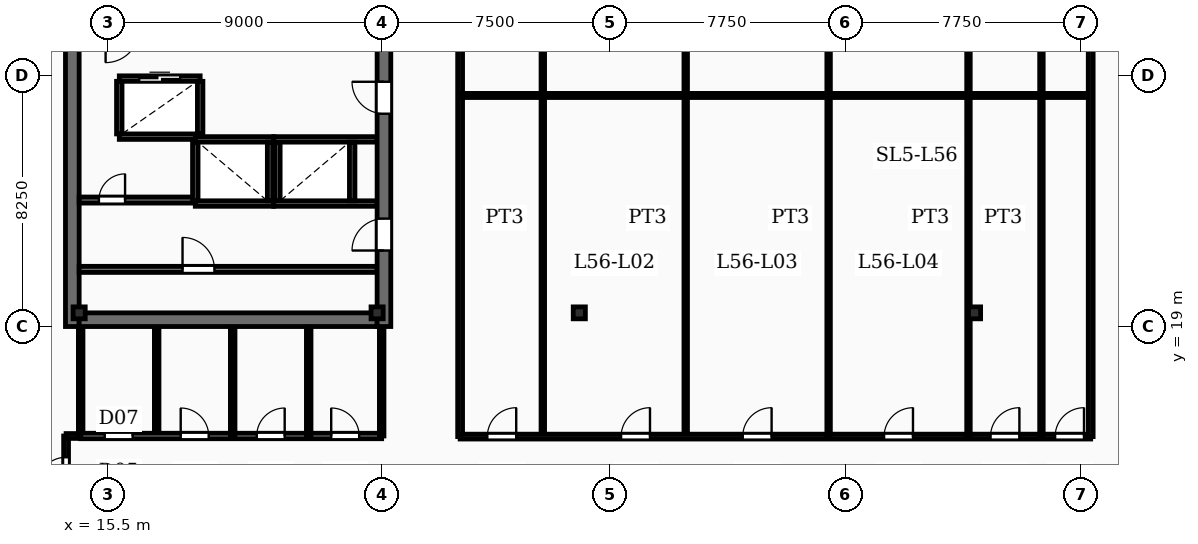
"""IFC4 building model, lengths in metres.
Left out: names, types, materials, properties, quantities, classifications, styles, units other than length and angle.
Written with IfcOpenShell. Run it as: python <this file> out.ifc"""

import sys

from ifc_helpers import new_model, si_unit, direction, frame, frame_2d, origin, origin_2d, place, context, subcontext, project, spatial, rectangle, i_section, extrude, element, fill, save


model = new_model("IFC4")
c1 = context("Model", 3, precision=1e-05, world=origin(), true_north=direction((0.0, 1.0)))
c2 = subcontext(c1, "Body", "Model", "MODEL_VIEW")
j1 = project(units=[si_unit("LENGTHUNIT", "METRE"), si_unit("PLANEANGLEUNIT", "RADIAN")], contexts=[c1])
p1 = place(None, origin())
s1 = spatial("IfcSite", under=j1, at=p1, CompositionType="ELEMENT")
p2 = place(p1, origin())
s2 = spatial("IfcBuilding", under=s1, at=p2, CompositionType="ELEMENT")
p3 = place(p2, frame((0.0, 0.0, 232.2)))
s3 = spatial("IfcBuildingStorey", under=s2, at=p3, CompositionType="ELEMENT", Elevation=232.2)
p4 = place(p3, frame((14.325, 19.0, -0.27), z_axis=(0.0, 0.0, 1.0), x_axis=(0.0, 1.0, 0.0)))
e1 = element("IfcWall", 1, at=p4, inside=s3, PredefinedType="SHEAR", context=c2, shape_type="SweptSolid", body=[
    extrude(rectangle(XDim=15.3, YDim=0.45, at=frame_2d((7.65, 0.0))), origin(), (0.0, 0.0, 1.0), 3.75),
])
p5 = place(p3, frame((24.575, 19.0, -0.27), z_axis=(0.0, 0.0, 1.0), x_axis=(0.0, 1.0, 0.0)))
e2 = element("IfcWall", 2, at=p5, inside=s3, PredefinedType="SHEAR", context=c2, shape_type="SweptSolid", body=[
    extrude(rectangle(XDim=15.3, YDim=0.45, at=frame_2d((7.65, 0.0))), origin(), (0.0, 0.0, 1.0), 3.75),
])
p6 = place(p5, frame((2.5, 0.0, 0.27)))
e3 = element("IfcOpeningElement", 3, at=p6, cuts=e2, PredefinedType="OPENING", context=c2, shape_type="SweptSolid", body=[
    extrude(rectangle(XDim=1.05, YDim=2.15, at=frame_2d((0.525, 1.075))), frame((0.0, 0.235, 0.0), z_axis=(0.0, -1.0, 0.0), x_axis=(1.0, 0.0, 0.0)), (0.0, 0.0, 1.0), 0.47),
])
p7 = place(p5, frame((7.0, 0.0, 0.27)))
e4 = element("IfcOpeningElement", 4, at=p7, cuts=e2, PredefinedType="OPENING", context=c2, shape_type="SweptSolid", body=[
    extrude(rectangle(XDim=1.05, YDim=2.15, at=frame_2d((0.525, 1.075))), frame((0.0, 0.235, 0.0), z_axis=(0.0, -1.0, 0.0), x_axis=(1.0, 0.0, 0.0)), (0.0, 0.0, 1.0), 0.47),
])
p8 = place(p3, frame((14.55, 19.225, -0.27), z_axis=(0.0, 0.0, 1.0), x_axis=(1.0, 0.0, 0.0)))
e5 = element("IfcWall", 5, at=p8, inside=s3, PredefinedType="SHEAR", context=c2, shape_type="SweptSolid", body=[
    extrude(rectangle(XDim=9.8, YDim=0.45, at=frame_2d((4.9, 0.0))), origin(), (0.0, 0.0, 1.0), 3.75),
])
for number, where, z_axis, x_axis in (
    (6, (14.55, 19.45, -0.27), (0.0, 0.0, 1.0), (1.0, 0.0, 0.0)),
    (7, (24.35, 19.45, -0.27), (0.0, 0.0, 1.0), (1.0, 0.0, 0.0)),
    (8, (31.0, 19.45, -0.27), (0.0, 0.0, 1.0), (1.0, 0.0, 0.0)),
    (9, (44.0, 19.45, -0.27), (0.0, 0.0, 1.0), (1.0, 0.0, 0.0)),
):
    element("IfcColumn", number, at=place(p3, frame(where, z_axis=z_axis, x_axis=x_axis)), inside=s3, PredefinedType="COLUMN", context=c2, shape_type="SweptSolid", body=[
        extrude(i_section(OverallWidth=0.399, OverallDepth=0.393, WebThickness=0.023, FlangeThickness=0.037, FilletRadius=0.02, at=origin_2d()), origin(), (0.0, 0.0, 1.0), 3.75),
    ])
p9 = place(p3, frame((10.211, 10.701, 0.0), z_axis=(0.0, 0.0, 1.0), x_axis=(0.113203107947, 0.993571867733, 0.0)))
e10 = element("IfcWall", 10, at=p9, inside=s3, PredefinedType="SOLIDWALL", context=c2, shape_type="SweptSolid", body=[
    extrude(rectangle(XDim=34.5, YDim=0.36, at=frame_2d((17.25, 0.0))), origin(), (0.0, 0.0, 1.0), 3.48),
])
p10 = place(p9, frame((4.2, 0.0, 0.88)))
e11 = element("IfcOpeningElement", 11, at=p10, cuts=e10, PredefinedType="OPENING", context=c2, shape_type="SweptSolid", body=[
    extrude(rectangle(XDim=1.35, YDim=2.2, at=frame_2d((0.675, 1.1))), frame((0.0, 0.19, 0.0), z_axis=(0.0, -1.0, 0.0), x_axis=(1.0, 0.0, 0.0)), (0.0, 0.0, 1.0), 0.38),
])
p11 = place(p9, frame((15.4, 0.0, 0.88)))
e12 = element("IfcOpeningElement", 12, at=p11, cuts=e10, PredefinedType="OPENING", context=c2, shape_type="SweptSolid", body=[
    extrude(rectangle(XDim=1.35, YDim=2.2, at=frame_2d((0.675, 1.1))), frame((0.0, 0.19, 0.0), z_axis=(0.0, -1.0, 0.0), x_axis=(1.0, 0.0, 0.0)), (0.0, 0.0, 1.0), 0.38),
])
p12 = place(p9, frame((26.6, 0.0, 0.88)))
e13 = element("IfcOpeningElement", 13, at=p12, cuts=e10, PredefinedType="OPENING", context=c2, shape_type="SweptSolid", body=[
    extrude(rectangle(XDim=1.35, YDim=2.2, at=frame_2d((0.675, 1.1))), frame((0.0, 0.19, 0.0), z_axis=(0.0, -1.0, 0.0), x_axis=(1.0, 0.0, 0.0)), (0.0, 0.0, 1.0), 0.38),
])
for number, where, z_axis, x_axis in (
    (14, (18.37, 25.155, 0.0), (0.0, 0.0, 1.0), (1.0, 0.0, 0.0)),
    (15, (18.37, 23.045, 0.0), (0.0, 0.0, 1.0), (1.0, 0.0, 0.0)),
):
    element("IfcWall", number, at=place(p3, frame(where, z_axis=z_axis, x_axis=x_axis)), inside=s3, PredefinedType="SOLIDWALL", context=c2, shape_type="SweptSolid", body=[
        extrude(rectangle(XDim=2.58, YDim=0.18, at=frame_2d((1.29, 0.0))), origin(), (0.0, 0.0, 1.0), 3.48),
    ])
for number, where, z_axis, x_axis in (
    (16, (18.37, 23.135, 0.0), (0.0, 0.0, 1.0), (0.0, 1.0, 0.0)),
    (17, (20.83, 23.135, 0.0), (0.0, 0.0, 1.0), (0.0, 1.0, 0.0)),
):
    element("IfcWall", number, at=place(p3, frame(where, z_axis=z_axis, x_axis=x_axis)), inside=s3, PredefinedType="SOLIDWALL", context=c2, shape_type="SweptSolid", body=[
        extrude(rectangle(XDim=1.93, YDim=0.18, at=frame_2d((0.965, 0.0))), origin(), (0.0, 0.0, 1.0), 3.48),
    ])
for number, where, z_axis, x_axis in (
    (18, (20.95, 25.155, 0.0), (0.0, 0.0, 1.0), (1.0, 0.0, 0.0)),
    (19, (20.95, 23.045, 0.0), (0.0, 0.0, 1.0), (1.0, 0.0, 0.0)),
):
    element("IfcWall", number, at=place(p3, frame(where, z_axis=z_axis, x_axis=x_axis)), inside=s3, PredefinedType="SOLIDWALL", context=c2, shape_type="SweptSolid", body=[
        extrude(rectangle(XDim=3.4, YDim=0.18, at=frame_2d((1.7, 0.0))), origin(), (0.0, 0.0, 1.0), 3.48),
    ])
for number, where, z_axis, x_axis in (
    (20, (21.07, 23.135, 0.0), (0.0, 0.0, 1.0), (0.0, 1.0, 0.0)),
    (21, (23.53, 23.135, 0.0), (0.0, 0.0, 1.0), (0.0, 1.0, 0.0)),
):
    element("IfcWall", number, at=place(p3, frame(where, z_axis=z_axis, x_axis=x_axis)), inside=s3, PredefinedType="SOLIDWALL", context=c2, shape_type="SweptSolid", body=[
        extrude(rectangle(XDim=1.93, YDim=0.18, at=frame_2d((0.965, 0.0))), origin(), (0.0, 0.0, 1.0), 3.48),
    ])
p13 = place(p3, frame((15.87, 27.155, 0.0), z_axis=(0.0, 0.0, 1.0), x_axis=(1.0, 0.0, 0.0)))
e22 = element("IfcWall", 22, at=p13, inside=s3, PredefinedType="SOLIDWALL", context=c2, shape_type="SweptSolid", body=[
    extrude(rectangle(XDim=2.66, YDim=0.18, at=frame_2d((1.33, 0.0))), origin(), (0.0, 0.0, 1.0), 3.48),
])
p14 = place(p13, frame((0.655, 0.0, 0.0)))
e23 = element("IfcOpeningElement", 23, at=p14, cuts=e22, PredefinedType="OPENING", context=c2, shape_type="SweptSolid", body=[
    extrude(rectangle(XDim=1.35, YDim=2.3, at=frame_2d((0.675, 1.15))), frame((0.0, 0.1, 0.0), z_axis=(0.0, -1.0, 0.0), x_axis=(1.0, 0.0, 0.0)), (0.0, 0.0, 1.0), 0.2),
])
p15 = place(p3, frame((15.87, 25.245, 0.0), z_axis=(0.0, 0.0, 1.0), x_axis=(1.0, 0.0, 0.0)))
e24 = element("IfcWall", 24, at=p15, inside=s3, PredefinedType="SOLIDWALL", context=c2, shape_type="SweptSolid", body=[
    extrude(rectangle(XDim=2.66, YDim=0.18, at=frame_2d((1.33, 0.0))), origin(), (0.0, 0.0, 1.0), 3.48),
])
for number, where, z_axis, x_axis in (
    (25, (15.87, 25.335, 0.0), (0.0, 0.0, 1.0), (0.0, 1.0, 0.0)),
    (26, (18.53, 25.335, 0.0), (0.0, 0.0, 1.0), (0.0, 1.0, 0.0)),
):
    element("IfcWall", number, at=place(p3, frame(where, z_axis=z_axis, x_axis=x_axis)), inside=s3, PredefinedType="SOLIDWALL", context=c2, shape_type="SweptSolid", body=[
        extrude(rectangle(XDim=1.73, YDim=0.18, at=frame_2d((0.865, 0.0))), origin(), (0.0, 0.0, 1.0), 3.48),
    ])
p16 = place(p3, frame((14.55, 20.88, 0.0), z_axis=(0.0, 0.0, 1.0), x_axis=(1.0, 0.0, 0.0)))
e27 = element("IfcWall", 27, at=p16, inside=s3, PredefinedType="SOLIDWALL", context=c2, shape_type="SweptSolid", body=[
    extrude(rectangle(XDim=9.8, YDim=0.2, at=frame_2d((4.9, 0.0))), origin(), (0.0, 0.0, 1.0), 2.54),
])
p17 = place(p16, frame((3.4, 0.0, 0.0)))
e28 = element("IfcOpeningElement", 28, at=p17, cuts=e27, PredefinedType="OPENING", context=c2, shape_type="SweptSolid", body=[
    extrude(rectangle(XDim=1.05, YDim=2.15, at=frame_2d((0.525, 1.075))), frame((0.0, 0.11, 0.0), z_axis=(0.0, -1.0, 0.0), x_axis=(1.0, 0.0, 0.0)), (0.0, 0.0, 1.0), 0.22),
])
p18 = place(p3, frame((14.55, 23.16, 0.0), z_axis=(0.0, 0.0, 1.0), x_axis=(1.0, 0.0, 0.0)))
e29 = element("IfcWall", 29, at=p18, inside=s3, PredefinedType="SOLIDWALL", context=c2, shape_type="SweptSolid", body=[
    extrude(rectangle(XDim=3.82, YDim=0.2, at=frame_2d((1.91, 0.0))), origin(), (0.0, 0.0, 1.0), 2.54),
])
p19 = place(p18, frame((0.65, 0.0, 0.0)))
e30 = element("IfcOpeningElement", 30, at=p19, cuts=e29, PredefinedType="OPENING", context=c2, shape_type="SweptSolid", body=[
    extrude(rectangle(XDim=0.86, YDim=2.05, at=frame_2d((0.43, 1.025))), frame((0.0, 0.11, 0.0), z_axis=(0.0, -1.0, 0.0), x_axis=(1.0, 0.0, 0.0)), (0.0, 0.0, 1.0), 0.22),
])
for number, where, z_axis, x_axis in (
    (31, (17.1, 15.4, 0.0), (0.0, 0.0, 1.0), (0.0, 1.0, 0.0)),
    (32, (19.6, 15.4, 0.0), (0.0, 0.0, 1.0), (0.0, 1.0, 0.0)),
    (33, (22.1, 15.4, 0.0), (0.0, 0.0, 1.0), (0.0, 1.0, 0.0)),
):
    element("IfcWall", number, at=place(p3, frame(where, z_axis=z_axis, x_axis=x_axis)), inside=s3, PredefinedType="PARTITIONING", context=c2, shape_type="SweptSolid", body=[
        extrude(rectangle(XDim=3.58, YDim=0.15, at=frame_2d((1.79, 0.0))), origin(), (0.0, 0.0, 1.0), 2.54),
    ])
p20 = place(p3, frame((14.6, 15.4, 0.0), z_axis=(0.0, 0.0, 1.0), x_axis=(1.0, 0.0, 0.0)))
e34 = element("IfcWall", 34, at=p20, inside=s3, PredefinedType="PARTITIONING", context=c2, shape_type="SweptSolid", body=[
    extrude(rectangle(XDim=9.9, YDim=0.18, at=frame_2d((4.95, 0.0))), origin(), (0.0, 0.0, 1.0), 2.54),
])
p21 = place(p20, frame((0.79, 0.0, 0.0)))
e35 = element("IfcOpeningElement", 35, at=p21, cuts=e34, PredefinedType="OPENING", context=c2, shape_type="SweptSolid", body=[
    extrude(rectangle(XDim=0.92, YDim=2.1, at=frame_2d((0.46, 1.05))), frame((0.0, 0.1, 0.0), z_axis=(0.0, -1.0, 0.0), x_axis=(1.0, 0.0, 0.0)), (0.0, 0.0, 1.0), 0.2),
])
p22 = place(p20, frame((3.29, 0.0, 0.0)))
e36 = element("IfcOpeningElement", 36, at=p22, cuts=e34, PredefinedType="OPENING", context=c2, shape_type="SweptSolid", body=[
    extrude(rectangle(XDim=0.92, YDim=2.1, at=frame_2d((0.46, 1.05))), frame((0.0, 0.1, 0.0), z_axis=(0.0, -1.0, 0.0), x_axis=(1.0, 0.0, 0.0)), (0.0, 0.0, 1.0), 0.2),
])
p23 = place(p20, frame((5.79, 0.0, 0.0)))
e37 = element("IfcOpeningElement", 37, at=p23, cuts=e34, PredefinedType="OPENING", context=c2, shape_type="SweptSolid", body=[
    extrude(rectangle(XDim=0.92, YDim=2.1, at=frame_2d((0.46, 1.05))), frame((0.0, 0.1, 0.0), z_axis=(0.0, -1.0, 0.0), x_axis=(1.0, 0.0, 0.0)), (0.0, 0.0, 1.0), 0.2),
])
p24 = place(p20, frame((8.24, 0.0, 0.0)))
e38 = element("IfcOpeningElement", 38, at=p24, cuts=e34, PredefinedType="OPENING", context=c2, shape_type="SweptSolid", body=[
    extrude(rectangle(XDim=0.92, YDim=2.1, at=frame_2d((0.46, 1.05))), frame((0.0, 0.1, 0.0), z_axis=(0.0, -1.0, 0.0), x_axis=(1.0, 0.0, 0.0)), (0.0, 0.0, 1.0), 0.2),
])
for number, where, z_axis, x_axis in (
    (39, (14.6, 15.4, 0.0), (0.0, 0.0, 1.0), (0.0, 1.0, 0.0)),
    (40, (24.5, 15.4, 0.0), (0.0, 0.0, 1.0), (0.0, 1.0, 0.0)),
):
    element("IfcWall", number, at=place(p3, frame(where, z_axis=z_axis, x_axis=x_axis)), inside=s3, PredefinedType="PARTITIONING", context=c2, shape_type="SweptSolid", body=[
        extrude(rectangle(XDim=3.58, YDim=0.15, at=frame_2d((1.79, 0.0))), origin(), (0.0, 0.0, 1.0), 2.54),
    ])
for number, where, z_axis, x_axis in (
    (41, (29.8, 15.38, 0.0), (0.0, 0.0, 1.0), (0.0, 1.0, 0.0)),
    (42, (34.5, 15.38, 0.0), (0.0, 0.0, 1.0), (0.0, 1.0, 0.0)),
    (43, (39.2, 15.38, 0.0), (0.0, 0.0, 1.0), (0.0, 1.0, 0.0)),
    (44, (43.8, 15.38, 0.0), (0.0, 0.0, 1.0), (0.0, 1.0, 0.0)),
    (45, (46.2, 15.38, 0.0), (0.0, 0.0, 1.0), (0.0, 1.0, 0.0)),
):
    element("IfcWall", number, at=place(p3, frame(where, z_axis=z_axis, x_axis=x_axis)), inside=s3, PredefinedType="PARTITIONING", context=c2, shape_type="SweptSolid", body=[
        extrude(rectangle(XDim=20.5, YDim=0.115, at=frame_2d((10.25, 0.0))), origin(), (0.0, 0.0, 1.0), 2.54),
    ])
p25 = place(p3, frame((27.08, 26.6, 0.0), z_axis=(0.0, 0.0, 1.0), x_axis=(1.0, 0.0, 0.0)))
e46 = element("IfcWall", 46, at=p25, inside=s3, PredefinedType="PARTITIONING", context=c2, shape_type="SweptSolid", body=[
    extrude(rectangle(XDim=20.74, YDim=0.135, at=frame_2d((10.37, 0.0))), origin(), (0.0, 0.0, 1.0), 2.54),
])
p26 = place(p3, frame((27.08, 15.38, 0.0), z_axis=(0.0, 0.0, 1.0), x_axis=(1.0, 0.0, 0.0)))
e47 = element("IfcWall", 47, at=p26, inside=s3, PredefinedType="PARTITIONING", context=c2, shape_type="SweptSolid", body=[
    extrude(rectangle(XDim=20.74, YDim=0.16, at=frame_2d((10.37, 0.0))), origin(), (0.0, 0.0, 1.0), 2.54),
])
p27 = place(p26, frame((0.895, 0.0, 0.0)))
e48 = element("IfcOpeningElement", 48, at=p27, cuts=e47, PredefinedType="OPENING", context=c2, shape_type="SweptSolid", body=[
    extrude(rectangle(XDim=0.95, YDim=2.15, at=frame_2d((0.475, 1.075))), frame((0.0, 0.09, 0.0), z_axis=(0.0, -1.0, 0.0), x_axis=(1.0, 0.0, 0.0)), (0.0, 0.0, 1.0), 0.18),
])
p28 = place(p26, frame((5.295, 0.0, 0.0)))
e49 = element("IfcOpeningElement", 49, at=p28, cuts=e47, PredefinedType="OPENING", context=c2, shape_type="SweptSolid", body=[
    extrude(rectangle(XDim=0.95, YDim=2.15, at=frame_2d((0.475, 1.075))), frame((0.0, 0.09, 0.0), z_axis=(0.0, -1.0, 0.0), x_axis=(1.0, 0.0, 0.0)), (0.0, 0.0, 1.0), 0.18),
])
p29 = place(p26, frame((9.295, 0.0, 0.0)))
e50 = element("IfcOpeningElement", 50, at=p29, cuts=e47, PredefinedType="OPENING", context=c2, shape_type="SweptSolid", body=[
    extrude(rectangle(XDim=0.95, YDim=2.15, at=frame_2d((0.475, 1.075))), frame((0.0, 0.09, 0.0), z_axis=(0.0, -1.0, 0.0), x_axis=(1.0, 0.0, 0.0)), (0.0, 0.0, 1.0), 0.18),
])
p30 = place(p26, frame((13.945, 0.0, 0.0)))
e51 = element("IfcOpeningElement", 51, at=p30, cuts=e47, PredefinedType="OPENING", context=c2, shape_type="SweptSolid", body=[
    extrude(rectangle(XDim=0.95, YDim=2.15, at=frame_2d((0.475, 1.075))), frame((0.0, 0.09, 0.0), z_axis=(0.0, -1.0, 0.0), x_axis=(1.0, 0.0, 0.0)), (0.0, 0.0, 1.0), 0.18),
])
p31 = place(p26, frame((17.445, 0.0, 0.0)))
e52 = element("IfcOpeningElement", 52, at=p31, cuts=e47, PredefinedType="OPENING", context=c2, shape_type="SweptSolid", body=[
    extrude(rectangle(XDim=0.95, YDim=2.15, at=frame_2d((0.475, 1.075))), frame((0.0, 0.09, 0.0), z_axis=(0.0, -1.0, 0.0), x_axis=(1.0, 0.0, 0.0)), (0.0, 0.0, 1.0), 0.18),
])
p32 = place(p26, frame((19.57, 0.0, 0.0)))
e53 = element("IfcOpeningElement", 53, at=p32, cuts=e47, PredefinedType="OPENING", context=c2, shape_type="SweptSolid", body=[
    extrude(rectangle(XDim=0.95, YDim=2.15, at=frame_2d((0.475, 1.075))), frame((0.0, 0.09, 0.0), z_axis=(0.0, -1.0, 0.0), x_axis=(1.0, 0.0, 0.0)), (0.0, 0.0, 1.0), 0.18),
])
for number, where, z_axis, x_axis in (
    (54, (27.08, 15.38, 0.0), (0.0, 0.0, 1.0), (0.0, 1.0, 0.0)),
    (55, (47.82, 15.38, 0.0), (0.0, 0.0, 1.0), (0.0, 1.0, 0.0)),
):
    element("IfcWall", number, at=place(p3, frame(where, z_axis=z_axis, x_axis=x_axis)), inside=s3, PredefinedType="PARTITIONING", context=c2, shape_type="SweptSolid", body=[
        extrude(rectangle(XDim=20.5, YDim=0.16, at=frame_2d((10.25, 0.0))), origin(), (0.0, 0.0, 1.0), 2.54),
    ])
p33 = place(p3, frame((14.12, 13.1, 0.0), z_axis=(0.0, 0.0, 1.0), x_axis=(0.0, 1.0, 0.0)))
e56 = element("IfcWall", 56, at=p33, inside=s3, PredefinedType="PARTITIONING", context=c2, shape_type="SweptSolid", body=[
    extrude(rectangle(XDim=2.3, YDim=0.16, at=frame_2d((1.15, 0.0))), origin(), (0.0, 0.0, 1.0), 2.54),
])
p34 = place(p33, frame((0.65, 0.0, 0.0)))
e57 = element("IfcOpeningElement", 57, at=p34, cuts=e56, PredefinedType="OPENING", context=c2, shape_type="SweptSolid", body=[
    extrude(rectangle(XDim=0.95, YDim=2.15, at=frame_2d((0.475, 1.075))), frame((0.0, 0.09, 0.0), z_axis=(0.0, -1.0, 0.0), x_axis=(1.0, 0.0, 0.0)), (0.0, 0.0, 1.0), 0.18),
])
p35 = place(p3, frame((14.12, 15.4, 0.0), z_axis=(0.0, 0.0, 1.0), x_axis=(1.0, 0.0, 0.0)))
e58 = element("IfcWall", 58, at=p35, inside=s3, PredefinedType="PARTITIONING", context=c2, shape_type="SweptSolid", body=[
    extrude(rectangle(XDim=0.5, YDim=0.16, at=frame_2d((0.25, 0.0))), origin(), (0.0, 0.0, 1.0), 2.54),
])
p36 = place(p6, origin())
e59 = element("IfcDoor", 59, at=p36, inside=s3, OperationType="SINGLE_SWING_LEFT", PredefinedType="DOOR", context=c2, shape_type="SweptSolid", body=[
    extrude(rectangle(XDim=1.05, YDim=2.15, at=frame_2d((0.525, 1.075))), frame((0.0, 0.025, 0.0), z_axis=(0.0, -1.0, 0.0), x_axis=(1.0, 0.0, 0.0)), (0.0, 0.0, 1.0), 0.05),
])
fill(e3, e59)
p37 = place(p7, origin())
e60 = element("IfcDoor", 60, at=p37, inside=s3, OperationType="SINGLE_SWING_RIGHT", PredefinedType="DOOR", context=c2, shape_type="SweptSolid", body=[
    extrude(rectangle(XDim=1.05, YDim=2.15, at=frame_2d((0.525, 1.075))), frame((0.0, 0.025, 0.0), z_axis=(0.0, -1.0, 0.0), x_axis=(1.0, 0.0, 0.0)), (0.0, 0.0, 1.0), 0.05),
])
fill(e4, e60)
p38 = place(p14, origin())
e61 = element("IfcDoor", 61, at=p38, inside=s3, OperationType="DOUBLE_DOOR_SLIDING", PredefinedType="DOOR", context=c2, shape_type="SweptSolid", body=[
    extrude(rectangle(XDim=1.35, YDim=2.3, at=frame_2d((0.675, 1.15))), frame((0.0, 0.025, 0.0), z_axis=(0.0, -1.0, 0.0), x_axis=(1.0, 0.0, 0.0)), (0.0, 0.0, 1.0), 0.05),
])
fill(e23, e61)
p39 = place(p17, origin())
e62 = element("IfcDoor", 62, at=p39, inside=s3, OperationType="SINGLE_SWING_LEFT", PredefinedType="DOOR", context=c2, shape_type="SweptSolid", body=[
    extrude(rectangle(XDim=1.05, YDim=2.15, at=frame_2d((0.525, 1.075))), frame((0.0, 0.025, 0.0), z_axis=(0.0, -1.0, 0.0), x_axis=(1.0, 0.0, 0.0)), (0.0, 0.0, 1.0), 0.05),
])
fill(e28, e62)
p40 = place(p19, origin())
e63 = element("IfcDoor", 63, at=p40, inside=s3, OperationType="SINGLE_SWING_RIGHT", PredefinedType="DOOR", context=c2, shape_type="SweptSolid", body=[
    extrude(rectangle(XDim=0.86, YDim=2.05, at=frame_2d((0.43, 1.025))), frame((0.0, 0.025, 0.0), z_axis=(0.0, -1.0, 0.0), x_axis=(1.0, 0.0, 0.0)), (0.0, 0.0, 1.0), 0.05),
])
fill(e30, e63)
p41 = place(p21, origin())
e64 = element("IfcDoor", 64, at=p41, inside=s3, OperationType="SINGLE_SWING_RIGHT", PredefinedType="DOOR", context=c2, shape_type="SweptSolid", body=[
    extrude(rectangle(XDim=0.92, YDim=2.1, at=frame_2d((0.46, 1.05))), frame((0.0, 0.025, 0.0), z_axis=(0.0, -1.0, 0.0), x_axis=(1.0, 0.0, 0.0)), (0.0, 0.0, 1.0), 0.05),
])
fill(e35, e64)
p42 = place(p22, origin())
e65 = element("IfcDoor", 65, at=p42, inside=s3, OperationType="SINGLE_SWING_LEFT", PredefinedType="DOOR", context=c2, shape_type="SweptSolid", body=[
    extrude(rectangle(XDim=0.92, YDim=2.1, at=frame_2d((0.46, 1.05))), frame((0.0, 0.025, 0.0), z_axis=(0.0, -1.0, 0.0), x_axis=(1.0, 0.0, 0.0)), (0.0, 0.0, 1.0), 0.05),
])
fill(e36, e65)
p43 = place(p23, origin())
e66 = element("IfcDoor", 66, at=p43, inside=s3, OperationType="SINGLE_SWING_RIGHT", PredefinedType="DOOR", context=c2, shape_type="SweptSolid", body=[
    extrude(rectangle(XDim=0.92, YDim=2.1, at=frame_2d((0.46, 1.05))), frame((0.0, 0.025, 0.0), z_axis=(0.0, -1.0, 0.0), x_axis=(1.0, 0.0, 0.0)), (0.0, 0.0, 1.0), 0.05),
])
fill(e37, e66)
p44 = place(p24, origin())
e67 = element("IfcDoor", 67, at=p44, inside=s3, OperationType="SINGLE_SWING_LEFT", PredefinedType="DOOR", context=c2, shape_type="SweptSolid", body=[
    extrude(rectangle(XDim=0.92, YDim=2.1, at=frame_2d((0.46, 1.05))), frame((0.0, 0.025, 0.0), z_axis=(0.0, -1.0, 0.0), x_axis=(1.0, 0.0, 0.0)), (0.0, 0.0, 1.0), 0.05),
])
fill(e38, e67)
p45 = place(p27, origin())
e68 = element("IfcDoor", 68, at=p45, inside=s3, OperationType="SINGLE_SWING_RIGHT", PredefinedType="DOOR", context=c2, shape_type="SweptSolid", body=[
    extrude(rectangle(XDim=0.95, YDim=2.15, at=frame_2d((0.475, 1.075))), frame((0.0, 0.025, 0.0), z_axis=(0.0, -1.0, 0.0), x_axis=(1.0, 0.0, 0.0)), (0.0, 0.0, 1.0), 0.05),
])
fill(e48, e68)
p46 = place(p28, origin())
e69 = element("IfcDoor", 69, at=p46, inside=s3, OperationType="SINGLE_SWING_RIGHT", PredefinedType="DOOR", context=c2, shape_type="SweptSolid", body=[
    extrude(rectangle(XDim=0.95, YDim=2.15, at=frame_2d((0.475, 1.075))), frame((0.0, 0.025, 0.0), z_axis=(0.0, -1.0, 0.0), x_axis=(1.0, 0.0, 0.0)), (0.0, 0.0, 1.0), 0.05),
])
fill(e49, e69)
p47 = place(p29, origin())
e70 = element("IfcDoor", 70, at=p47, inside=s3, OperationType="SINGLE_SWING_RIGHT", PredefinedType="DOOR", context=c2, shape_type="SweptSolid", body=[
    extrude(rectangle(XDim=0.95, YDim=2.15, at=frame_2d((0.475, 1.075))), frame((0.0, 0.025, 0.0), z_axis=(0.0, -1.0, 0.0), x_axis=(1.0, 0.0, 0.0)), (0.0, 0.0, 1.0), 0.05),
])
fill(e50, e70)
p48 = place(p30, origin())
e71 = element("IfcDoor", 71, at=p48, inside=s3, OperationType="SINGLE_SWING_RIGHT", PredefinedType="DOOR", context=c2, shape_type="SweptSolid", body=[
    extrude(rectangle(XDim=0.95, YDim=2.15, at=frame_2d((0.475, 1.075))), frame((0.0, 0.025, 0.0), z_axis=(0.0, -1.0, 0.0), x_axis=(1.0, 0.0, 0.0)), (0.0, 0.0, 1.0), 0.05),
])
fill(e51, e71)
p49 = place(p31, origin())
e72 = element("IfcDoor", 72, at=p49, inside=s3, OperationType="SINGLE_SWING_RIGHT", PredefinedType="DOOR", context=c2, shape_type="SweptSolid", body=[
    extrude(rectangle(XDim=0.95, YDim=2.15, at=frame_2d((0.475, 1.075))), frame((0.0, 0.025, 0.0), z_axis=(0.0, -1.0, 0.0), x_axis=(1.0, 0.0, 0.0)), (0.0, 0.0, 1.0), 0.05),
])
fill(e52, e72)
p50 = place(p32, origin())
e73 = element("IfcDoor", 73, at=p50, inside=s3, OperationType="SINGLE_SWING_RIGHT", PredefinedType="DOOR", context=c2, shape_type="SweptSolid", body=[
    extrude(rectangle(XDim=0.95, YDim=2.15, at=frame_2d((0.475, 1.075))), frame((0.0, 0.025, 0.0), z_axis=(0.0, -1.0, 0.0), x_axis=(1.0, 0.0, 0.0)), (0.0, 0.0, 1.0), 0.05),
])
fill(e53, e73)
p51 = place(p34, origin())
e74 = element("IfcDoor", 74, at=p51, inside=s3, OperationType="SINGLE_SWING_LEFT", PredefinedType="DOOR", context=c2, shape_type="SweptSolid", body=[
    extrude(rectangle(XDim=0.95, YDim=2.15, at=frame_2d((0.475, 1.075))), frame((0.0, 0.025, 0.0), z_axis=(0.0, -1.0, 0.0), x_axis=(1.0, 0.0, 0.0)), (0.0, 0.0, 1.0), 0.05),
])
fill(e57, e74)
save(model, sys.argv[1])
